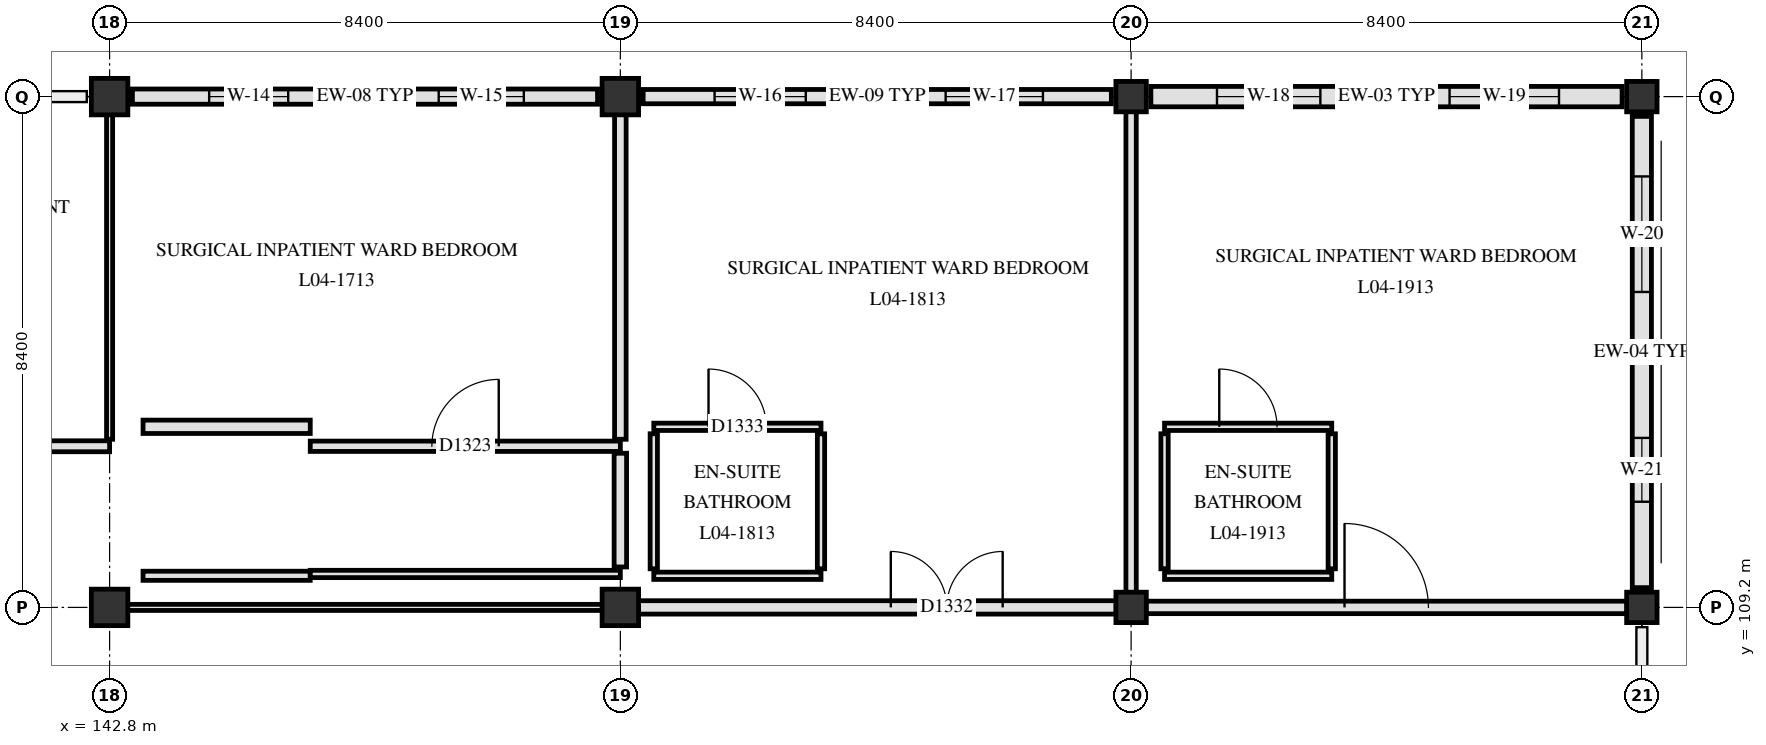
"""IFC4 building model, lengths in metres.
Left out: names, types, materials, properties, quantities, classifications, styles, units other than length and angle.
Written with IfcOpenShell. Run it as: python <this file> out.ifc"""

import sys

from ifc_helpers import new_model, si_unit, direction, frame, frame_2d, origin, origin_2d, place, context, subcontext, project, spatial, rectangle, extrude, element, fill, save


model = new_model("IFC4")
c1 = context("Model", 3, precision=1e-05, world=origin(), true_north=direction((0.0, 1.0)))
c2 = subcontext(c1, "Body", "Model", "MODEL_VIEW")
j1 = project(units=[si_unit("LENGTHUNIT", "METRE"), si_unit("PLANEANGLEUNIT", "RADIAN")], contexts=[c1])
p1 = place(None, origin())
s1 = spatial("IfcSite", under=j1, at=p1, CompositionType="ELEMENT")
p2 = place(p1, origin())
s2 = spatial("IfcBuilding", under=s1, at=p2, CompositionType="ELEMENT")
p3 = place(p2, frame((0.0, 0.0, 18.6)))
s3 = spatial("IfcBuildingStorey", under=s2, at=p3, CompositionType="ELEMENT", Elevation=18.6)
for number, where, z_axis, x_axis in (
    (1, (142.8, 109.2, 0.0), (0.0, 0.0, 1.0), (1.0, 0.0, 0.0)),
    (2, (142.8, 117.6, 0.0), (0.0, 0.0, 1.0), (1.0, 0.0, 0.0)),
    (3, (151.2, 109.2, 0.0), (0.0, 0.0, 1.0), (1.0, 0.0, 0.0)),
    (4, (151.2, 117.6, 0.0), (0.0, 0.0, 1.0), (1.0, 0.0, 0.0)),
):
    element("IfcColumn", number, at=place(p3, frame(where, z_axis=z_axis, x_axis=x_axis)), inside=s3, PredefinedType="COLUMN", context=c2, shape_type="SweptSolid", body=[
        extrude(rectangle(XDim=0.6, YDim=0.6, at=origin_2d()), origin(), (0.0, 0.0, 1.0), 3.9),
    ])
for number, where, z_axis, x_axis in (
    (5, (159.6, 109.2, 0.0), (0.0, 0.0, 1.0), (1.0, 0.0, 0.0)),
    (6, (159.6, 117.6, 0.0), (0.0, 0.0, 1.0), (1.0, 0.0, 0.0)),
    (7, (168.0, 109.2, 0.0), (0.0, 0.0, 1.0), (1.0, 0.0, 0.0)),
    (8, (168.0, 117.6, 0.0), (0.0, 0.0, 1.0), (1.0, 0.0, 0.0)),
):
    element("IfcColumn", number, at=place(p3, frame(where, z_axis=z_axis, x_axis=x_axis)), inside=s3, PredefinedType="COLUMN", context=c2, shape_type="SweptSolid", body=[
        extrude(rectangle(XDim=0.5, YDim=0.5, at=origin_2d()), origin(), (0.0, 0.0, 1.0), 3.9),
    ])
p4 = place(p3, frame((143.175, 117.6, 0.0), z_axis=(0.0, 0.0, 1.0), x_axis=(1.0, 0.0, 0.0)))
e9 = element("IfcWall", 9, at=p4, inside=s3, PredefinedType="SOLIDWALL", context=c2, shape_type="SweptSolid", body=[
    extrude(rectangle(XDim=7.65, YDim=0.25, at=frame_2d((3.825, 0.0))), origin(), (0.0, 0.0, 1.0), 3.31),
])
p5 = place(p4, frame((1.262, 0.0, 0.85)))
e10 = element("IfcOpeningElement", 10, at=p5, cuts=e9, PredefinedType="OPENING", context=c2, shape_type="SweptSolid", body=[
    extrude(rectangle(XDim=1.3, YDim=1.42, at=frame_2d((0.65, 0.71))), frame((0.0, 0.135, 0.0), z_axis=(0.0, -1.0, 0.0), x_axis=(1.0, 0.0, 0.0)), (0.0, 0.0, 1.0), 0.27),
])
p6 = place(p4, frame((5.038, 0.0, 0.85)))
e11 = element("IfcOpeningElement", 11, at=p6, cuts=e9, PredefinedType="OPENING", context=c2, shape_type="SweptSolid", body=[
    extrude(rectangle(XDim=1.4, YDim=1.42, at=frame_2d((0.7, 0.71))), frame((0.0, 0.135, 0.0), z_axis=(0.0, -1.0, 0.0), x_axis=(1.0, 0.0, 0.0)), (0.0, 0.0, 1.0), 0.27),
])
p7 = place(p3, frame((151.575, 117.6, 0.0), z_axis=(0.0, 0.0, 1.0), x_axis=(1.0, 0.0, 0.0)))
e12 = element("IfcWall", 12, at=p7, inside=s3, PredefinedType="SOLIDWALL", context=c2, shape_type="SweptSolid", body=[
    extrude(rectangle(XDim=7.7, YDim=0.235, at=frame_2d((3.85, 0.0))), origin(), (0.0, 0.0, 1.0), 3.31),
])
p8 = place(p7, frame((1.175, 0.0, 0.85)))
e13 = element("IfcOpeningElement", 13, at=p8, cuts=e12, PredefinedType="OPENING", context=c2, shape_type="SweptSolid", body=[
    extrude(rectangle(XDim=1.5, YDim=1.42, at=frame_2d((0.75, 0.71))), frame((0.0, 0.127, 0.0), z_axis=(0.0, -1.0, 0.0), x_axis=(1.0, 0.0, 0.0)), (0.0, 0.0, 1.0), 0.255),
])
p9 = place(p7, frame((4.975, 0.0, 0.85)))
e14 = element("IfcOpeningElement", 14, at=p9, cuts=e12, PredefinedType="OPENING", context=c2, shape_type="SweptSolid", body=[
    extrude(rectangle(XDim=1.6, YDim=1.42, at=frame_2d((0.8, 0.71))), frame((0.0, 0.127, 0.0), z_axis=(0.0, -1.0, 0.0), x_axis=(1.0, 0.0, 0.0)), (0.0, 0.0, 1.0), 0.255),
])
p10 = place(p3, frame((159.925, 117.6, 0.0), z_axis=(0.0, 0.0, 1.0), x_axis=(1.0, 0.0, 0.0)))
e15 = element("IfcWall", 15, at=p10, inside=s3, PredefinedType="SOLIDWALL", context=c2, shape_type="SweptSolid", body=[
    extrude(rectangle(XDim=7.75, YDim=0.335, at=frame_2d((3.875, 0.0))), origin(), (0.0, 0.0, 1.0), 3.3),
])
p11 = place(p10, frame((1.087, 0.0, 0.85)))
e16 = element("IfcOpeningElement", 16, at=p11, cuts=e15, PredefinedType="OPENING", context=c2, shape_type="SweptSolid", body=[
    extrude(rectangle(XDim=1.7, YDim=1.42, at=frame_2d((0.85, 0.71))), frame((0.0, 0.177, 0.0), z_axis=(0.0, -1.0, 0.0), x_axis=(1.0, 0.0, 0.0)), (0.0, 0.0, 1.0), 0.355),
])
p12 = place(p10, frame((4.913, 0.0, 0.85)))
e17 = element("IfcOpeningElement", 17, at=p12, cuts=e15, PredefinedType="OPENING", context=c2, shape_type="SweptSolid", body=[
    extrude(rectangle(XDim=1.8, YDim=1.42, at=frame_2d((0.9, 0.71))), frame((0.0, 0.177, 0.0), z_axis=(0.0, -1.0, 0.0), x_axis=(1.0, 0.0, 0.0)), (0.0, 0.0, 1.0), 0.355),
])
p13 = place(p3, frame((168.0, 117.275, 0.0), z_axis=(0.0, 0.0, 1.0), x_axis=(0.0, -1.0, 0.0)))
e18 = element("IfcWall", 18, at=p13, inside=s3, PredefinedType="SOLIDWALL", context=c2, shape_type="SweptSolid", body=[
    extrude(rectangle(XDim=7.75, YDim=0.315, at=frame_2d((3.875, 0.0))), origin(), (0.0, 0.0, 1.0), 3.3),
])
p14 = place(p13, frame((0.988, 0.0, 0.85)))
e19 = element("IfcOpeningElement", 19, at=p14, cuts=e18, PredefinedType="OPENING", context=c2, shape_type="SweptSolid", body=[
    extrude(rectangle(XDim=1.9, YDim=1.42, at=frame_2d((0.95, 0.71))), frame((0.0, 0.167, 0.0), z_axis=(0.0, -1.0, 0.0), x_axis=(1.0, 0.0, 0.0)), (0.0, 0.0, 1.0), 0.335),
])
p15 = place(p13, frame((5.288, 0.0, 0.85)))
e20 = element("IfcOpeningElement", 20, at=p15, cuts=e18, PredefinedType="OPENING", context=c2, shape_type="SweptSolid", body=[
    extrude(rectangle(XDim=1.05, YDim=1.54, at=frame_2d((0.525, 0.77))), frame((0.0, 0.167, 0.0), z_axis=(0.0, -1.0, 0.0), x_axis=(1.0, 0.0, 0.0)), (0.0, 0.0, 1.0), 0.335),
])
p16 = place(p3, frame((143.095, 109.2, 0.0), z_axis=(0.0, 0.0, 1.0), x_axis=(1.0, 0.0, 0.0)))
e21 = element("IfcWall", 21, at=p16, inside=s3, PredefinedType="PARTITIONING", context=c2, shape_type="SweptSolid", body=[
    extrude(rectangle(XDim=7.81, YDim=0.1, at=frame_2d((3.905, 0.0))), origin(), (0.0, 0.0, 1.0), 3.16),
])
p17 = place(p3, frame((151.495, 109.2, 0.0), z_axis=(0.0, 0.0, 1.0), x_axis=(1.0, 0.0, 0.0)))
e22 = element("IfcWall", 22, at=p17, inside=s3, PredefinedType="PARTITIONING", context=c2, shape_type="SweptSolid", body=[
    extrude(rectangle(XDim=7.86, YDim=0.22, at=frame_2d((3.93, 0.0))), origin(), (0.0, 0.0, 1.0), 3.16),
])
p18 = place(p17, frame((4.153, 0.0, 0.0)))
e23 = element("IfcOpeningElement", 23, at=p18, cuts=e22, PredefinedType="OPENING", context=c2, shape_type="SweptSolid", body=[
    extrude(rectangle(XDim=1.84, YDim=2.28, at=frame_2d((0.92, 1.14))), frame((0.0, 0.12, 0.0), z_axis=(0.0, -1.0, 0.0), x_axis=(1.0, 0.0, 0.0)), (0.0, 0.0, 1.0), 0.24),
])
p19 = place(p3, frame((159.845, 109.2, 0.0), z_axis=(0.0, 0.0, 1.0), x_axis=(1.0, 0.0, 0.0)))
e24 = element("IfcWall", 24, at=p19, inside=s3, PredefinedType="PARTITIONING", context=c2, shape_type="SweptSolid", body=[
    extrude(rectangle(XDim=7.91, YDim=0.205, at=frame_2d((3.955, 0.0))), origin(), (0.0, 0.0, 1.0), 3.15),
])
p20 = place(p19, frame((3.265, 0.0, 0.0)))
e25 = element("IfcOpeningElement", 25, at=p20, cuts=e24, PredefinedType="OPENING", context=c2, shape_type="SweptSolid", body=[
    extrude(rectangle(XDim=1.38, YDim=2.22, at=frame_2d((0.69, 1.11))), frame((0.0, 0.113, 0.0), z_axis=(0.0, -1.0, 0.0), x_axis=(1.0, 0.0, 0.0)), (0.0, 0.0, 1.0), 0.225),
])
p21 = place(p3, frame((143.35, 109.72, 0.0), z_axis=(0.0, 0.0, 1.0), x_axis=(1.0, 0.0, 0.0)))
e26 = element("IfcWall", 26, at=p21, inside=s3, PredefinedType="PARTITIONING", context=c2, shape_type="SweptSolid", body=[
    extrude(rectangle(XDim=2.75, YDim=0.15, at=frame_2d((1.375, 0.0))), origin(), (0.0, 0.0, 1.0), 3.61),
])
for number, where, z_axis, x_axis in (
    (27, (151.75, 109.72, 0.0), (0.0, 0.0, 1.0), (1.0, 0.0, 0.0)),
    (28, (160.15, 109.72, 0.0), (0.0, 0.0, 1.0), (1.0, 0.0, 0.0)),
):
    element("IfcWall", number, at=place(p3, frame(where, z_axis=z_axis, x_axis=x_axis)), inside=s3, PredefinedType="PARTITIONING", context=c2, shape_type="SweptSolid", body=[
        extrude(rectangle(XDim=2.75, YDim=0.12, at=frame_2d((1.375, 0.0))), origin(), (0.0, 0.0, 1.0), 3.61),
    ])
p22 = place(p3, frame((146.1, 109.75, 0.0), z_axis=(0.0, 0.0, 1.0), x_axis=(1.0, 0.0, 0.0)))
e29 = element("IfcWall", 29, at=p22, inside=s3, PredefinedType="PARTITIONING", context=c2, shape_type="SweptSolid", body=[
    extrude(rectangle(XDim=5.1, YDim=0.12, at=frame_2d((2.55, 0.0))), origin(), (0.0, 0.0, 1.0), 3.26),
])
p23 = place(p3, frame((137.7, 111.85, 0.0), z_axis=(0.0, 0.0, 1.0), x_axis=(1.0, 0.0, 0.0)))
e30 = element("IfcWall", 30, at=p23, inside=s3, PredefinedType="PARTITIONING", context=c2, shape_type="SweptSolid", body=[
    extrude(rectangle(XDim=5.1, YDim=0.18, at=frame_2d((2.55, 0.0))), origin(), (0.0, 0.0, 1.0), 3.26),
])
p24 = place(p23, frame((1.875, 0.0, 0.0)))
e31 = element("IfcOpeningElement", 31, at=p24, cuts=e30, PredefinedType="OPENING", context=c2, shape_type="SweptSolid", body=[
    extrude(rectangle(XDim=1.35, YDim=2.2, at=frame_2d((0.675, 1.1))), frame((0.0, 0.1, 0.0), z_axis=(0.0, -1.0, 0.0), x_axis=(1.0, 0.0, 0.0)), (0.0, 0.0, 1.0), 0.2),
])
p25 = place(p3, frame((146.1, 111.85, 0.0), z_axis=(0.0, 0.0, 1.0), x_axis=(1.0, 0.0, 0.0)))
e32 = element("IfcWall", 32, at=p25, inside=s3, PredefinedType="PARTITIONING", context=c2, shape_type="SweptSolid", body=[
    extrude(rectangle(XDim=5.1, YDim=0.17, at=frame_2d((2.55, 0.0))), origin(), (0.0, 0.0, 1.0), 3.26),
])
p26 = place(p25, frame((2.0, 0.0, 0.0)))
e33 = element("IfcOpeningElement", 33, at=p26, cuts=e32, PredefinedType="OPENING", context=c2, shape_type="SweptSolid", body=[
    extrude(rectangle(XDim=1.1, YDim=2.15, at=frame_2d((0.55, 1.075))), frame((0.0, 0.095, 0.0), z_axis=(0.0, -1.0, 0.0), x_axis=(1.0, 0.0, 0.0)), (0.0, 0.0, 1.0), 0.19),
])
p27 = place(p3, frame((143.35, 112.17, 0.0), z_axis=(0.0, 0.0, 1.0), x_axis=(1.0, 0.0, 0.0)))
e34 = element("IfcWall", 34, at=p27, inside=s3, PredefinedType="PARTITIONING", context=c2, shape_type="SweptSolid", body=[
    extrude(rectangle(XDim=2.75, YDim=0.22, at=frame_2d((1.375, 0.0))), origin(), (0.0, 0.0, 1.0), 3.31),
])
p28 = place(p3, frame((151.75, 112.17, 0.0), z_axis=(0.0, 0.0, 1.0), x_axis=(1.0, 0.0, 0.0)))
e35 = element("IfcWall", 35, at=p28, inside=s3, PredefinedType="PARTITIONING", context=c2, shape_type="SweptSolid", body=[
    extrude(rectangle(XDim=2.75, YDim=0.12, at=frame_2d((1.375, 0.0))), origin(), (0.0, 0.0, 1.0), 3.61),
])
p29 = place(p28, frame((0.9, 0.0, 0.0)))
e36 = element("IfcOpeningElement", 36, at=p29, cuts=e35, PredefinedType="OPENING", context=c2, shape_type="SweptSolid", body=[
    extrude(rectangle(XDim=0.95, YDim=2.1, at=frame_2d((0.475, 1.05))), frame((0.0, 0.07, 0.0), z_axis=(0.0, -1.0, 0.0), x_axis=(1.0, 0.0, 0.0)), (0.0, 0.0, 1.0), 0.14),
])
p30 = place(p3, frame((160.15, 112.17, 0.0), z_axis=(0.0, 0.0, 1.0), x_axis=(1.0, 0.0, 0.0)))
e37 = element("IfcWall", 37, at=p30, inside=s3, PredefinedType="PARTITIONING", context=c2, shape_type="SweptSolid", body=[
    extrude(rectangle(XDim=2.75, YDim=0.12, at=frame_2d((1.375, 0.0))), origin(), (0.0, 0.0, 1.0), 3.61),
])
p31 = place(p30, frame((0.9, 0.0, 0.0)))
e38 = element("IfcOpeningElement", 38, at=p31, cuts=e37, PredefinedType="OPENING", context=c2, shape_type="SweptSolid", body=[
    extrude(rectangle(XDim=0.95, YDim=2.1, at=frame_2d((0.475, 1.05))), frame((0.0, 0.07, 0.0), z_axis=(0.0, -1.0, 0.0), x_axis=(1.0, 0.0, 0.0)), (0.0, 0.0, 1.0), 0.14),
])
p32 = place(p3, frame((142.8, 111.965, 0.0), z_axis=(0.0, 0.0, 1.0), x_axis=(0.0, 1.0, 0.0)))
e39 = element("IfcWall", 39, at=p32, inside=s3, PredefinedType="PARTITIONING", context=c2, shape_type="SweptSolid", body=[
    extrude(rectangle(XDim=5.34, YDim=0.1, at=frame_2d((2.67, 0.0))), origin(), (0.0, 0.0, 1.0), 3.26),
])
p33 = place(p3, frame((151.2, 109.865, 0.0), z_axis=(0.0, 0.0, 1.0), x_axis=(0.0, 1.0, 0.0)))
e40 = element("IfcWall", 40, at=p33, inside=s3, PredefinedType="PARTITIONING", context=c2, shape_type="SweptSolid", body=[
    extrude(rectangle(XDim=1.87, YDim=0.205, at=frame_2d((0.935, 0.0))), origin(), (0.0, 0.0, 1.0), 3.26),
])
p34 = place(p3, frame((151.2, 111.965, 0.0), z_axis=(0.0, 0.0, 1.0), x_axis=(0.0, 1.0, 0.0)))
e41 = element("IfcWall", 41, at=p34, inside=s3, PredefinedType="PARTITIONING", context=c2, shape_type="SweptSolid", body=[
    extrude(rectangle(XDim=5.34, YDim=0.19, at=frame_2d((2.67, 0.0))), origin(), (0.0, 0.0, 1.0), 3.26),
])
for number, where, z_axis, x_axis in (
    (42, (151.75, 109.835, 0.0), (0.0, 0.0, 1.0), (0.0, 1.0, 0.0)),
    (43, (154.5, 109.835, 0.0), (0.0, 0.0, 1.0), (0.0, 1.0, 0.0)),
):
    element("IfcWall", number, at=place(p3, frame(where, z_axis=z_axis, x_axis=x_axis)), inside=s3, PredefinedType="PARTITIONING", context=c2, shape_type="SweptSolid", body=[
        extrude(rectangle(XDim=2.22, YDim=0.12, at=frame_2d((1.11, 0.0))), origin(), (0.0, 0.0, 1.0), 3.31),
    ])
p35 = place(p3, frame((159.6, 109.445, 0.0), z_axis=(0.0, 0.0, 1.0), x_axis=(0.0, 1.0, 0.0)))
e44 = element("IfcWall", 44, at=p35, inside=s3, PredefinedType="PARTITIONING", context=c2, shape_type="SweptSolid", body=[
    extrude(rectangle(XDim=7.91, YDim=0.17, at=frame_2d((3.955, 0.0))), origin(), (0.0, 0.0, 1.0), 3.25),
])
for number, where, z_axis, x_axis in (
    (45, (160.15, 109.835, 0.0), (0.0, 0.0, 1.0), (0.0, 1.0, 0.0)),
    (46, (162.9, 109.835, 0.0), (0.0, 0.0, 1.0), (0.0, 1.0, 0.0)),
):
    element("IfcWall", number, at=place(p3, frame(where, z_axis=z_axis, x_axis=x_axis)), inside=s3, PredefinedType="PARTITIONING", context=c2, shape_type="SweptSolid", body=[
        extrude(rectangle(XDim=2.22, YDim=0.12, at=frame_2d((1.11, 0.0))), origin(), (0.0, 0.0, 1.0), 3.3),
    ])
p36 = place(p5, origin())
e47 = element("IfcWindow", 47, at=p36, inside=s3, PartitioningType="SINGLE_PANEL", PredefinedType="WINDOW", context=c2, shape_type="SweptSolid", body=[
    extrude(rectangle(XDim=1.3, YDim=1.42, at=frame_2d((0.65, 0.71))), frame((0.0, 0.03, 0.0), z_axis=(0.0, -1.0, 0.0), x_axis=(1.0, 0.0, 0.0)), (0.0, 0.0, 1.0), 0.06),
])
fill(e10, e47)
p37 = place(p6, origin())
e48 = element("IfcWindow", 48, at=p37, inside=s3, PartitioningType="SINGLE_PANEL", PredefinedType="WINDOW", context=c2, shape_type="SweptSolid", body=[
    extrude(rectangle(XDim=1.4, YDim=1.42, at=frame_2d((0.7, 0.71))), frame((0.0, 0.03, 0.0), z_axis=(0.0, -1.0, 0.0), x_axis=(1.0, 0.0, 0.0)), (0.0, 0.0, 1.0), 0.06),
])
fill(e11, e48)
p38 = place(p8, origin())
e49 = element("IfcWindow", 49, at=p38, inside=s3, PartitioningType="SINGLE_PANEL", PredefinedType="WINDOW", context=c2, shape_type="SweptSolid", body=[
    extrude(rectangle(XDim=1.5, YDim=1.42, at=frame_2d((0.75, 0.71))), frame((0.0, 0.03, 0.0), z_axis=(0.0, -1.0, 0.0), x_axis=(1.0, 0.0, 0.0)), (0.0, 0.0, 1.0), 0.06),
])
fill(e13, e49)
p39 = place(p9, origin())
e50 = element("IfcWindow", 50, at=p39, inside=s3, PartitioningType="SINGLE_PANEL", PredefinedType="WINDOW", context=c2, shape_type="SweptSolid", body=[
    extrude(rectangle(XDim=1.6, YDim=1.42, at=frame_2d((0.8, 0.71))), frame((0.0, 0.03, 0.0), z_axis=(0.0, -1.0, 0.0), x_axis=(1.0, 0.0, 0.0)), (0.0, 0.0, 1.0), 0.06),
])
fill(e14, e50)
p40 = place(p11, origin())
e51 = element("IfcWindow", 51, at=p40, inside=s3, PartitioningType="SINGLE_PANEL", PredefinedType="WINDOW", context=c2, shape_type="SweptSolid", body=[
    extrude(rectangle(XDim=1.7, YDim=1.42, at=frame_2d((0.85, 0.71))), frame((0.0, 0.03, 0.0), z_axis=(0.0, -1.0, 0.0), x_axis=(1.0, 0.0, 0.0)), (0.0, 0.0, 1.0), 0.06),
])
fill(e16, e51)
p41 = place(p12, origin())
e52 = element("IfcWindow", 52, at=p41, inside=s3, PartitioningType="SINGLE_PANEL", PredefinedType="WINDOW", context=c2, shape_type="SweptSolid", body=[
    extrude(rectangle(XDim=1.8, YDim=1.42, at=frame_2d((0.9, 0.71))), frame((0.0, 0.03, 0.0), z_axis=(0.0, -1.0, 0.0), x_axis=(1.0, 0.0, 0.0)), (0.0, 0.0, 1.0), 0.06),
])
fill(e17, e52)
p42 = place(p14, origin())
e53 = element("IfcWindow", 53, at=p42, inside=s3, PartitioningType="SINGLE_PANEL", PredefinedType="WINDOW", context=c2, shape_type="SweptSolid", body=[
    extrude(rectangle(XDim=1.9, YDim=1.42, at=frame_2d((0.95, 0.71))), frame((0.0, 0.03, 0.0), z_axis=(0.0, -1.0, 0.0), x_axis=(1.0, 0.0, 0.0)), (0.0, 0.0, 1.0), 0.06),
])
fill(e19, e53)
p43 = place(p15, origin())
e54 = element("IfcWindow", 54, at=p43, inside=s3, PartitioningType="SINGLE_PANEL", PredefinedType="WINDOW", context=c2, shape_type="SweptSolid", body=[
    extrude(rectangle(XDim=1.05, YDim=1.54, at=frame_2d((0.525, 0.77))), frame((0.0, 0.03, 0.0), z_axis=(0.0, -1.0, 0.0), x_axis=(1.0, 0.0, 0.0)), (0.0, 0.0, 1.0), 0.06),
])
fill(e20, e54)
p44 = place(p26, origin())
e55 = element("IfcDoor", 55, at=p44, inside=s3, OperationType="SINGLE_SWING_RIGHT", PredefinedType="DOOR", context=c2, shape_type="SweptSolid", body=[
    extrude(rectangle(XDim=1.1, YDim=2.15, at=frame_2d((0.55, 1.075))), frame((0.0, 0.025, 0.0), z_axis=(0.0, -1.0, 0.0), x_axis=(1.0, 0.0, 0.0)), (0.0, 0.0, 1.0), 0.05),
])
fill(e33, e55)
p45 = place(p18, origin())
e56 = element("IfcDoor", 56, at=p45, inside=s3, OperationType="DOUBLE_SWING_LEFT", PredefinedType="DOOR", context=c2, shape_type="SweptSolid", body=[
    extrude(rectangle(XDim=1.84, YDim=2.28, at=frame_2d((0.92, 1.14))), frame((0.0, 0.025, 0.0), z_axis=(0.0, -1.0, 0.0), x_axis=(1.0, 0.0, 0.0)), (0.0, 0.0, 1.0), 0.05),
])
fill(e23, e56)
p46 = place(p29, origin())
e57 = element("IfcDoor", 57, at=p46, inside=s3, OperationType="SINGLE_SWING_LEFT", PredefinedType="DOOR", context=c2, shape_type="SweptSolid", body=[
    extrude(rectangle(XDim=0.95, YDim=2.1, at=frame_2d((0.475, 1.05))), frame((0.0, 0.025, 0.0), z_axis=(0.0, -1.0, 0.0), x_axis=(1.0, 0.0, 0.0)), (0.0, 0.0, 1.0), 0.05),
])
fill(e36, e57)
p47 = place(p20, origin())
e58 = element("IfcDoor", 58, at=p47, inside=s3, OperationType="SINGLE_SWING_LEFT", PredefinedType="DOOR", context=c2, shape_type="SweptSolid", body=[
    extrude(rectangle(XDim=1.38, YDim=2.22, at=frame_2d((0.69, 1.11))), frame((0.0, 0.025, 0.0), z_axis=(0.0, -1.0, 0.0), x_axis=(1.0, 0.0, 0.0)), (0.0, 0.0, 1.0), 0.05),
])
fill(e25, e58)
p48 = place(p31, origin())
e59 = element("IfcDoor", 59, at=p48, inside=s3, OperationType="SINGLE_SWING_LEFT", PredefinedType="DOOR", context=c2, shape_type="SweptSolid", body=[
    extrude(rectangle(XDim=0.95, YDim=2.1, at=frame_2d((0.475, 1.05))), frame((0.0, 0.025, 0.0), z_axis=(0.0, -1.0, 0.0), x_axis=(1.0, 0.0, 0.0)), (0.0, 0.0, 1.0), 0.05),
])
fill(e38, e59)
save(model, sys.argv[1])
